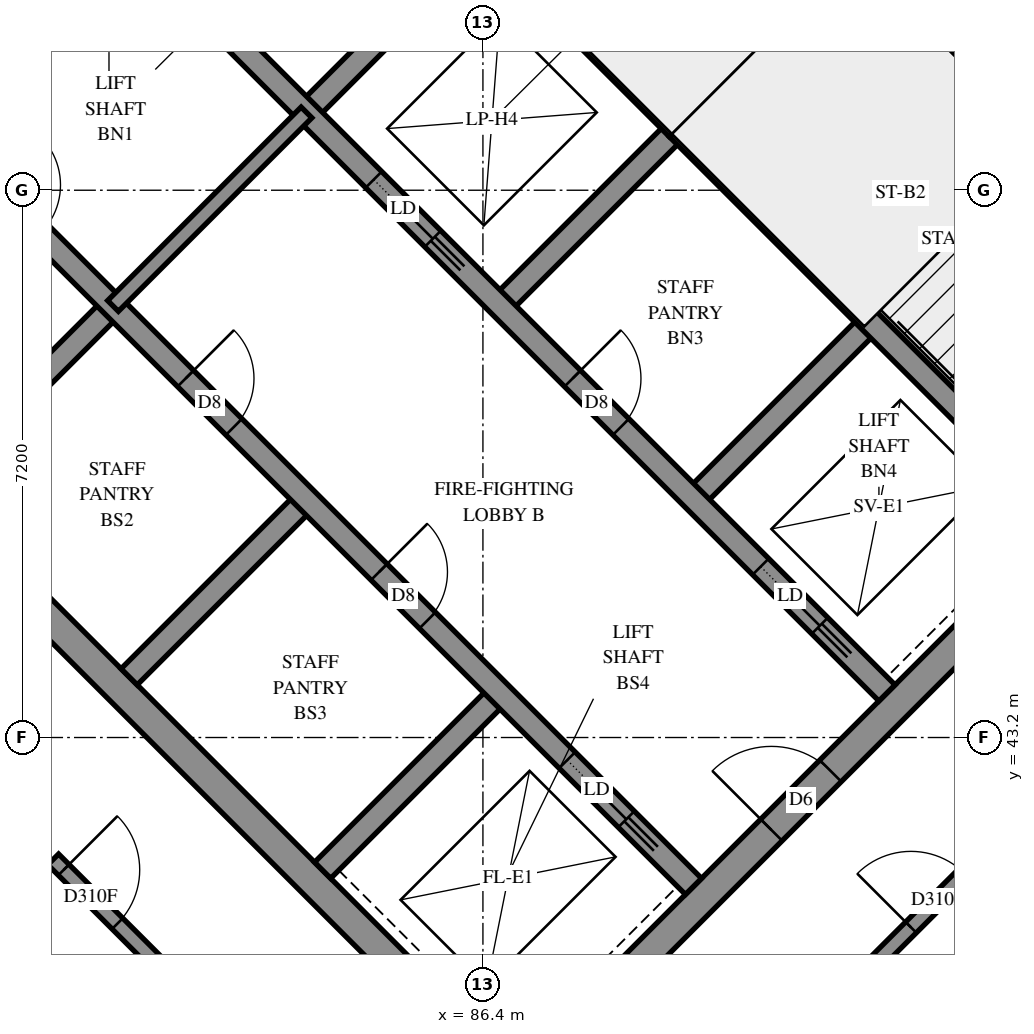
"""IFC4 building model, lengths in metres.
Left out: names, types, materials, properties, quantities, classifications, styles, units other than length and angle.
Written with IfcOpenShell. Run it as: python <this file> out.ifc"""

import sys

from ifc_helpers import new_model, si_unit, direction, frame, frame_2d, origin, place, context, subcontext, project, spatial, rectangle, extrude, element, fill, save


model = new_model("IFC4")
c1 = context("Model", 3, precision=1e-05, world=origin(), true_north=direction((0.0, 1.0)))
c2 = subcontext(c1, "Body", "Model", "MODEL_VIEW")
j1 = project(units=[si_unit("LENGTHUNIT", "METRE"), si_unit("PLANEANGLEUNIT", "RADIAN")], contexts=[c1])
p1 = place(None, origin())
s1 = spatial("IfcSite", under=j1, at=p1, CompositionType="ELEMENT")
p2 = place(p1, origin())
s2 = spatial("IfcBuilding", under=s1, at=p2, CompositionType="ELEMENT")
p3 = place(p2, frame((0.0, 0.0, 274.4)))
s3 = spatial("IfcBuildingStorey", under=s2, at=p3, CompositionType="ELEMENT", Elevation=274.4)
p4 = place(p3, frame((76.23, 49.231, -0.3), z_axis=(0.0, 0.0, 1.0), x_axis=(0.7071034917, -0.7071100706, 0.0)))
e1 = element("IfcWall", 1, at=p4, inside=s3, PredefinedType="SHEAR", context=c2, shape_type="SweptSolid", body=[
    extrude(rectangle(XDim=15.2, YDim=0.4, at=frame_2d((7.6, 0.0))), origin(), (0.0, 0.0, 1.0), 2.7),
])
p5 = place(p3, frame((86.695, 59.696, -0.3), z_axis=(0.0, 0.0, 1.0), x_axis=(0.7071100706, -0.7071034917, 0.0)))
e2 = element("IfcWall", 2, at=p5, inside=s3, PredefinedType="SHEAR", context=c2, shape_type="SweptSolid", body=[
    extrude(rectangle(XDim=15.2, YDim=0.4, at=frame_2d((7.6, 0.0))), origin(), (0.0, 0.0, 1.0), 2.7),
])
p6 = place(p5, frame((10.4, 0.0, 0.3)))
e3 = element("IfcOpeningElement", 3, at=p6, cuts=e2, PredefinedType="OPENING", context=c2, shape_type="SweptSolid", body=[
    extrude(rectangle(XDim=0.8, YDim=2.1, at=frame_2d((0.4, 1.05))), frame((0.0, 0.21, 0.0), z_axis=(0.0, -1.0, 0.0), x_axis=(1.0, 0.0, 0.0)), (0.0, 0.0, 1.0), 0.42),
])
p7 = place(p3, frame((76.513, 49.231, -0.3), z_axis=(0.0, 0.0, 1.0), x_axis=(0.7071067812, 0.7071067812, 0.0)))
e4 = element("IfcWall", 4, at=p7, inside=s3, PredefinedType="SHEAR", context=c2, shape_type="SweptSolid", body=[
    extrude(rectangle(XDim=14.4, YDim=0.4, at=frame_2d((7.2, 0.0))), origin(), (0.0, 0.0, 1.0), 2.7),
])
p8 = place(p7, frame((4.55, 0.0, 0.3)))
e5 = element("IfcOpeningElement", 5, at=p8, cuts=e4, PredefinedType="OPENING", context=c2, shape_type="SweptSolid", body=[
    extrude(rectangle(XDim=1.1, YDim=2.1, at=frame_2d((0.55, 1.05))), frame((0.0, 0.21, 0.0), z_axis=(0.0, -1.0, 0.0), x_axis=(1.0, 0.0, 0.0)), (0.0, 0.0, 1.0), 0.42),
])
p9 = place(p7, frame((11.35, 0.0, 0.3)))
e6 = element("IfcOpeningElement", 6, at=p9, cuts=e4, PredefinedType="OPENING", context=c2, shape_type="SweptSolid", body=[
    extrude(rectangle(XDim=1.1, YDim=2.1, at=frame_2d((0.55, 1.05))), frame((0.0, 0.21, 0.0), z_axis=(0.0, -1.0, 0.0), x_axis=(1.0, 0.0, 0.0)), (0.0, 0.0, 1.0), 0.42),
])
p10 = place(p3, frame((86.978, 38.766, -0.3), z_axis=(0.0, 0.0, 1.0), x_axis=(0.7071067812, 0.7071067812, 0.0)))
e7 = element("IfcWall", 7, at=p10, inside=s3, PredefinedType="SHEAR", context=c2, shape_type="SweptSolid", body=[
    extrude(rectangle(XDim=14.4, YDim=0.4, at=frame_2d((7.2, 0.0))), origin(), (0.0, 0.0, 1.0), 2.7),
])
p11 = place(p10, frame((4.55, 0.0, 0.3)))
e8 = element("IfcOpeningElement", 8, at=p11, cuts=e7, PredefinedType="OPENING", context=c2, shape_type="SweptSolid", body=[
    extrude(rectangle(XDim=1.1, YDim=2.1, at=frame_2d((0.55, 1.05))), frame((0.0, 0.21, 0.0), z_axis=(0.0, -1.0, 0.0), x_axis=(1.0, 0.0, 0.0)), (0.0, 0.0, 1.0), 0.42),
])
p12 = place(p10, frame((11.35, 0.0, 0.3)))
e9 = element("IfcOpeningElement", 9, at=p12, cuts=e7, PredefinedType="OPENING", context=c2, shape_type="SweptSolid", body=[
    extrude(rectangle(XDim=1.1, YDim=2.1, at=frame_2d((0.55, 1.05))), frame((0.0, 0.21, 0.0), z_axis=(0.0, -1.0, 0.0), x_axis=(1.0, 0.0, 0.0)), (0.0, 0.0, 1.0), 0.42),
])
for number, where, z_axis, x_axis in (
    (10, (79.2, 46.544, 0.0), (0.0, 0.0, 1.0), (0.707, 0.707, 0.0)),
    (11, (84.079, 51.423, 0.0), (0.0, 0.0, 1.0), (0.707, 0.707, 0.0)),
):
    element("IfcWall", number, at=place(p3, frame(where, z_axis=z_axis, x_axis=x_axis)), inside=s3, PredefinedType="SOLIDWALL", context=c2, shape_type="SweptSolid", body=[
        extrude(rectangle(XDim=3.3, YDim=0.3, at=frame_2d((1.65, 0.0))), origin(), (0.0, 0.0, 1.0), 3.1),
    ])
p13 = place(p3, frame((81.746, 43.999, 0.0), z_axis=(0.0, 0.0, 1.0), x_axis=(0.7071067812, 0.7071067812, 0.0)))
e12 = element("IfcWall", 12, at=p13, inside=s3, PredefinedType="SOLIDWALL", context=c2, shape_type="SweptSolid", body=[
    extrude(rectangle(XDim=3.3, YDim=0.3, at=frame_2d((1.65, 0.0))), origin(), (0.0, 0.0, 1.0), 3.1),
])
p14 = place(p3, frame((86.625, 48.878, 0.0), z_axis=(0.0, 0.0, 1.0), x_axis=(0.7071067812, 0.7071067812, 0.0)))
e13 = element("IfcWall", 13, at=p14, inside=s3, PredefinedType="SOLIDWALL", context=c2, shape_type="SweptSolid", body=[
    extrude(rectangle(XDim=3.3, YDim=0.3, at=frame_2d((1.65, 0.0))), origin(), (0.0, 0.0, 1.0), 3.1),
])
p15 = place(p3, frame((84.291, 41.453, 0.0), z_axis=(0.0, 0.0, 1.0), x_axis=(0.7071067812, 0.7071067812, 0.0)))
e14 = element("IfcWall", 14, at=p15, inside=s3, PredefinedType="SOLIDWALL", context=c2, shape_type="SweptSolid", body=[
    extrude(rectangle(XDim=3.3, YDim=0.3, at=frame_2d((1.65, 0.0))), origin(), (0.0, 0.0, 1.0), 3.1),
])
p16 = place(p3, frame((89.17, 46.332, 0.0), z_axis=(0.0, 0.0, 1.0), x_axis=(0.7071067812, 0.7071067812, 0.0)))
e15 = element("IfcWall", 15, at=p16, inside=s3, PredefinedType="SOLIDWALL", context=c2, shape_type="SweptSolid", body=[
    extrude(rectangle(XDim=3.3, YDim=0.3, at=frame_2d((1.65, 0.0))), origin(), (0.0, 0.0, 1.0), 3.1),
])
p17 = place(p3, frame((78.988, 51.423, 0.0), z_axis=(0.0, 0.0, 1.0), x_axis=(0.7071067812, -0.7071067812, 0.0)))
e16 = element("IfcWall", 16, at=p17, inside=s3, PredefinedType="SOLIDWALL", context=c2, shape_type="SweptSolid", body=[
    extrude(rectangle(XDim=14.4, YDim=0.3, at=frame_2d((7.2, 0.0))), origin(), (0.0, 0.0, 1.0), 3.1),
])
p18 = place(p17, frame((1.35, 0.0, 0.0)))
e17 = element("IfcOpeningElement", 17, at=p18, cuts=e16, PredefinedType="OPENING", context=c2, shape_type="SweptSolid", body=[
    extrude(rectangle(XDim=0.9, YDim=2.1, at=frame_2d((0.45, 1.05))), frame((0.0, 0.16, 0.0), z_axis=(0.0, -1.0, 0.0), x_axis=(1.0, 0.0, 0.0)), (0.0, 0.0, 1.0), 0.32),
])
p19 = place(p17, frame((4.95, 0.0, 0.0)))
e18 = element("IfcOpeningElement", 18, at=p19, cuts=e16, PredefinedType="OPENING", context=c2, shape_type="SweptSolid", body=[
    extrude(rectangle(XDim=0.9, YDim=2.1, at=frame_2d((0.45, 1.05))), frame((0.0, 0.16, 0.0), z_axis=(0.0, -1.0, 0.0), x_axis=(1.0, 0.0, 0.0)), (0.0, 0.0, 1.0), 0.32),
])
p20 = place(p17, frame((8.55, 0.0, 0.0)))
e19 = element("IfcOpeningElement", 19, at=p20, cuts=e16, PredefinedType="OPENING", context=c2, shape_type="SweptSolid", body=[
    extrude(rectangle(XDim=0.9, YDim=2.1, at=frame_2d((0.45, 1.05))), frame((0.0, 0.16, 0.0), z_axis=(0.0, -1.0, 0.0), x_axis=(1.0, 0.0, 0.0)), (0.0, 0.0, 1.0), 0.32),
])
p21 = place(p17, frame((12.05, 0.0, 0.0)))
e20 = element("IfcOpeningElement", 20, at=p21, cuts=e16, PredefinedType="OPENING", context=c2, shape_type="SweptSolid", body=[
    extrude(rectangle(XDim=1.1, YDim=2.1, at=frame_2d((0.55, 1.05))), frame((0.0, 0.16, 0.0), z_axis=(0.0, -1.0, 0.0), x_axis=(1.0, 0.0, 0.0)), (0.0, 0.0, 1.0), 0.32),
])
p22 = place(p3, frame((81.534, 53.969, 0.0), z_axis=(0.0, 0.0, 1.0), x_axis=(0.707103309, -0.7071102534, 0.0)))
e21 = element("IfcWall", 21, at=p22, inside=s3, PredefinedType="SOLIDWALL", context=c2, shape_type="SweptSolid", body=[
    extrude(rectangle(XDim=14.4, YDim=0.3, at=frame_2d((7.2, 0.0))), origin(), (0.0, 0.0, 1.0), 3.1),
])
p23 = place(p22, frame((8.55, 0.0, 0.0)))
e22 = element("IfcOpeningElement", 22, at=p23, cuts=e21, PredefinedType="OPENING", context=c2, shape_type="SweptSolid", body=[
    extrude(rectangle(XDim=0.9, YDim=2.1, at=frame_2d((0.45, 1.05))), frame((0.0, 0.16, 0.0), z_axis=(0.0, -1.0, 0.0), x_axis=(1.0, 0.0, 0.0)), (0.0, 0.0, 1.0), 0.32),
])
p24 = place(p22, frame((1.25, 0.0, 0.0)))
e23 = element("IfcOpeningElement", 23, at=p24, cuts=e21, PredefinedType="OPENING", context=c2, shape_type="SweptSolid", body=[
    extrude(rectangle(XDim=1.1, YDim=2.1, at=frame_2d((0.55, 1.05))), frame((0.0, 0.16, 0.0), z_axis=(0.0, -1.0, 0.0), x_axis=(1.0, 0.0, 0.0)), (0.0, 0.0, 1.0), 0.32),
])
p25 = place(p22, frame((4.85, 0.0, 0.0)))
e24 = element("IfcOpeningElement", 24, at=p25, cuts=e21, PredefinedType="OPENING", context=c2, shape_type="SweptSolid", body=[
    extrude(rectangle(XDim=1.1, YDim=2.1, at=frame_2d((0.55, 1.05))), frame((0.0, 0.16, 0.0), z_axis=(0.0, -1.0, 0.0), x_axis=(1.0, 0.0, 0.0)), (0.0, 0.0, 1.0), 0.32),
])
p26 = place(p22, frame((12.05, 0.0, 0.0)))
e25 = element("IfcOpeningElement", 25, at=p26, cuts=e21, PredefinedType="OPENING", context=c2, shape_type="SweptSolid", body=[
    extrude(rectangle(XDim=1.1, YDim=2.1, at=frame_2d((0.55, 1.05))), frame((0.0, 0.16, 0.0), z_axis=(0.0, -1.0, 0.0), x_axis=(1.0, 0.0, 0.0)), (0.0, 0.0, 1.0), 0.32),
])
for number, where, z_axis, x_axis in (
    (26, (83.867, 56.302, 0.0), (0.0, 0.0, 1.0), (0.707, -0.707, 0.0)),
    (27, (88.958, 51.211, 0.0), (0.0, 0.0, 1.0), (0.707, -0.707, 0.0)),
):
    element("IfcWall", number, at=place(p3, frame(where, z_axis=z_axis, x_axis=x_axis)), inside=s3, PredefinedType="SOLIDWALL", context=c2, shape_type="SweptSolid", body=[
        extrude(rectangle(XDim=7.2, YDim=0.3, at=frame_2d((3.6, 0.0))), origin(), (0.0, 0.0, 1.0), 3.1),
    ])
p27 = place(p3, frame((88.958, 51.211, 0.0), z_axis=(0.0, 0.0, 1.0), x_axis=(0.7071067812, 0.7071067812, 0.0)))
e28 = element("IfcWall", 28, at=p27, inside=s3, PredefinedType="SOLIDWALL", context=c2, shape_type="SweptSolid", body=[
    extrude(rectangle(XDim=4.2, YDim=0.3, at=frame_2d((2.1, 0.0))), origin(), (0.0, 0.0, 1.0), 3.1),
])
p28 = place(p3, frame((91.313, 53.354, 0.0), z_axis=(0.0, 0.0, 1.0), x_axis=(0.7071067812, -0.7071067812, 0.0)))
e29 = element("IfcWall", 29, at=p28, inside=s3, PredefinedType="PARTITIONING", context=c2, shape_type="SweptSolid", body=[
    extrude(rectangle(XDim=5.65, YDim=0.15, at=frame_2d((2.825, 0.0))), origin(), (0.0, 0.0, 1.0), 3.1),
])
p29 = place(p3, frame((81.534, 48.878, 0.0), z_axis=(0.0, 0.0, 1.0), x_axis=(0.707092892, 0.7071206701, 0.0)))
e30 = element("IfcWall", 30, at=p29, inside=s3, PredefinedType="PARTITIONING", context=c2, shape_type="SweptSolid", body=[
    extrude(rectangle(XDim=3.6, YDim=0.2, at=frame_2d((1.8, 0.0))), origin(), (0.0, 0.0, 1.0), 3.1),
])
p30 = place(p3, frame((86.306, 33.287, 0.0), z_axis=(0.0, 0.0, 1.0), x_axis=(0.7071020418, 0.7071115206, 0.0)))
e31 = element("IfcWall", 31, at=p30, inside=s3, PredefinedType="PARTITIONING", context=c2, shape_type="SweptSolid", body=[
    extrude(rectangle(XDim=10.55, YDim=0.2, at=frame_2d((5.275, 0.0))), origin(), (0.0, 0.0, 1.0), 3.1),
])
p31 = place(p3, frame((80.747, 41.597, 0.0), z_axis=(0.0, 0.0, 1.0), x_axis=(0.7071067812, -0.7071067812, 0.0)))
e32 = element("IfcWall", 32, at=p31, inside=s3, PredefinedType="PARTITIONING", context=c2, shape_type="SweptSolid", body=[
    extrude(rectangle(XDim=8.607, YDim=0.2, at=frame_2d((4.303, 0.0))), origin(), (0.0, 0.0, 1.0), 3.1),
])
p32 = place(p31, frame((0.195, 0.0, 0.0)))
e33 = element("IfcOpeningElement", 33, at=p32, cuts=e32, PredefinedType="OPENING", context=c2, shape_type="SweptSolid", body=[
    extrude(rectangle(XDim=1.0, YDim=2.1, at=frame_2d((0.5, 1.05))), frame((0.0, 0.11, 0.0), z_axis=(0.0, -1.0, 0.0), x_axis=(1.0, 0.0, 0.0)), (0.0, 0.0, 1.0), 0.22),
])
p33 = place(p31, frame((3.175, 0.0, 0.0)))
e34 = element("IfcOpeningElement", 34, at=p33, cuts=e32, PredefinedType="OPENING", context=c2, shape_type="SweptSolid", body=[
    extrude(rectangle(XDim=1.0, YDim=2.1, at=frame_2d((0.5, 1.05))), frame((0.0, 0.11, 0.0), z_axis=(0.0, -1.0, 0.0), x_axis=(1.0, 0.0, 0.0)), (0.0, 0.0, 1.0), 0.22),
])
p34 = place(p3, frame((86.839, 35.511, 0.0), z_axis=(0.0, 0.0, 1.0), x_axis=(0.707223053, 0.7069904903, 0.0)))
e35 = element("IfcWall", 35, at=p34, inside=s3, PredefinedType="PARTITIONING", context=c2, shape_type="SweptSolid", body=[
    extrude(rectangle(XDim=8.6, YDim=0.2, at=frame_2d((4.3, 0.0))), origin(), (0.0, 0.0, 1.0), 3.1),
])
p35 = place(p34, frame((7.343, 0.0, 0.0)))
e36 = element("IfcOpeningElement", 36, at=p35, cuts=e35, PredefinedType="OPENING", context=c2, shape_type="SweptSolid", body=[
    extrude(rectangle(XDim=1.0, YDim=2.1, at=frame_2d((0.5, 1.05))), frame((0.0, 0.11, 0.0), z_axis=(0.0, -1.0, 0.0), x_axis=(1.0, 0.0, 0.0)), (0.0, 0.0, 1.0), 0.22),
])
p36 = place(p11, origin())
e37 = element("IfcDoor", 37, at=p36, inside=s3, OperationType="DOUBLE_DOOR_SINGLE_SWING", PredefinedType="DOOR", context=c2, shape_type="SweptSolid", body=[
    extrude(rectangle(XDim=1.1, YDim=2.1, at=frame_2d((0.55, 1.05))), frame((0.0, 0.025, 0.0), z_axis=(0.0, -1.0, 0.0), x_axis=(1.0, 0.0, 0.0)), (0.0, 0.0, 1.0), 0.05),
])
fill(e8, e37)
p37 = place(p19, origin())
e38 = element("IfcDoor", 38, at=p37, inside=s3, OperationType="SINGLE_SWING_LEFT", PredefinedType="DOOR", context=c2, shape_type="SweptSolid", body=[
    extrude(rectangle(XDim=0.9, YDim=2.1, at=frame_2d((0.45, 1.05))), frame((0.0, 0.025, 0.0), z_axis=(0.0, -1.0, 0.0), x_axis=(1.0, 0.0, 0.0)), (0.0, 0.0, 1.0), 0.05),
])
fill(e18, e38)
p38 = place(p20, origin())
e39 = element("IfcDoor", 39, at=p38, inside=s3, OperationType="SINGLE_SWING_LEFT", PredefinedType="DOOR", context=c2, shape_type="SweptSolid", body=[
    extrude(rectangle(XDim=0.9, YDim=2.1, at=frame_2d((0.45, 1.05))), frame((0.0, 0.025, 0.0), z_axis=(0.0, -1.0, 0.0), x_axis=(1.0, 0.0, 0.0)), (0.0, 0.0, 1.0), 0.05),
])
fill(e19, e39)
p39 = place(p23, origin())
e40 = element("IfcDoor", 40, at=p39, inside=s3, OperationType="SINGLE_SWING_LEFT", PredefinedType="DOOR", context=c2, shape_type="SweptSolid", body=[
    extrude(rectangle(XDim=0.9, YDim=2.1, at=frame_2d((0.45, 1.05))), frame((0.0, 0.025, 0.0), z_axis=(0.0, -1.0, 0.0), x_axis=(1.0, 0.0, 0.0)), (0.0, 0.0, 1.0), 0.05),
])
fill(e22, e40)
p40 = place(p21, origin())
e41 = element("IfcDoor", 41, at=p40, inside=s3, OperationType="SLIDING_TO_RIGHT", PredefinedType="DOOR", context=c2, shape_type="SweptSolid", body=[
    extrude(rectangle(XDim=1.1, YDim=2.1, at=frame_2d((0.55, 1.05))), frame((0.0, 0.025, 0.0), z_axis=(0.0, -1.0, 0.0), x_axis=(1.0, 0.0, 0.0)), (0.0, 0.0, 1.0), 0.05),
])
fill(e20, e41)
p41 = place(p25, origin())
e42 = element("IfcDoor", 42, at=p41, inside=s3, OperationType="SLIDING_TO_RIGHT", PredefinedType="DOOR", context=c2, shape_type="SweptSolid", body=[
    extrude(rectangle(XDim=1.1, YDim=2.1, at=frame_2d((0.55, 1.05))), frame((0.0, 0.025, 0.0), z_axis=(0.0, -1.0, 0.0), x_axis=(1.0, 0.0, 0.0)), (0.0, 0.0, 1.0), 0.05),
])
fill(e24, e42)
p42 = place(p26, origin())
e43 = element("IfcDoor", 43, at=p42, inside=s3, OperationType="SLIDING_TO_RIGHT", PredefinedType="DOOR", context=c2, shape_type="SweptSolid", body=[
    extrude(rectangle(XDim=1.1, YDim=2.1, at=frame_2d((0.55, 1.05))), frame((0.0, 0.025, 0.0), z_axis=(0.0, -1.0, 0.0), x_axis=(1.0, 0.0, 0.0)), (0.0, 0.0, 1.0), 0.05),
])
fill(e25, e43)
p43 = place(p32, origin())
e44 = element("IfcDoor", 44, at=p43, inside=s3, OperationType="SINGLE_SWING_LEFT", PredefinedType="DOOR", context=c2, shape_type="SweptSolid", body=[
    extrude(rectangle(XDim=1.0, YDim=2.1, at=frame_2d((0.5, 1.05))), frame((0.0, 0.025, 0.0), z_axis=(0.0, -1.0, 0.0), x_axis=(1.0, 0.0, 0.0)), (0.0, 0.0, 1.0), 0.05),
])
fill(e33, e44)
p44 = place(p35, origin())
e45 = element("IfcDoor", 45, at=p44, inside=s3, OperationType="SINGLE_SWING_RIGHT", PredefinedType="DOOR", context=c2, shape_type="SweptSolid", body=[
    extrude(rectangle(XDim=1.0, YDim=2.1, at=frame_2d((0.5, 1.05))), frame((0.0, 0.025, 0.0), z_axis=(0.0, -1.0, 0.0), x_axis=(1.0, 0.0, 0.0)), (0.0, 0.0, 1.0), 0.05),
])
fill(e36, e45)
save(model, sys.argv[1])
